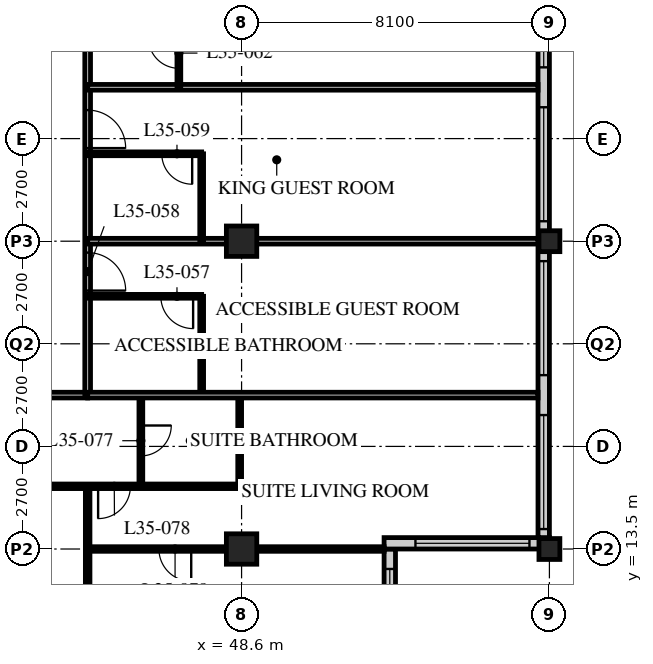
"""IFC4 building model, lengths in metres.
Left out: names, types, materials, properties, quantities, classifications, styles, units other than length and angle.
Written with IfcOpenShell. Run it as: python <this file> out.ifc"""

import sys

from ifc_helpers import new_model, si_unit, direction, frame, frame_2d, origin, origin_2d, place, context, subcontext, project, spatial, rectangle, hollow_rectangle, extrude, element, fill, save


model = new_model("IFC4")
c1 = context("Model", 3, precision=1e-05, world=origin(), true_north=direction((0.0, 1.0)))
c2 = subcontext(c1, "Body", "Model", "MODEL_VIEW")
j1 = project(units=[si_unit("LENGTHUNIT", "METRE"), si_unit("PLANEANGLEUNIT", "RADIAN")], contexts=[c1])
p1 = place(None, origin())
s1 = spatial("IfcSite", under=j1, at=p1, CompositionType="ELEMENT")
p2 = place(p1, origin())
s2 = spatial("IfcBuilding", under=s1, at=p2, CompositionType="ELEMENT")
p3 = place(p2, frame((0.0, 0.0, 137.4)))
s3 = spatial("IfcBuildingStorey", under=s2, at=p3, CompositionType="ELEMENT", Elevation=137.4)
for number, where, z_axis, x_axis in (
    (1, (48.6, 13.5, 0.0), (0.0, 0.0, 1.0), (1.0, 0.0, 0.0)),
    (2, (48.6, 21.6, 0.0), (0.0, 0.0, 1.0), (1.0, 0.0, 0.0)),
):
    element("IfcColumn", number, at=place(p3, frame(where, z_axis=z_axis, x_axis=x_axis)), inside=s3, PredefinedType="COLUMN", context=c2, shape_type="SweptSolid", body=[
        extrude(hollow_rectangle(XDim=0.8, YDim=0.8, WallThickness=0.08, at=origin_2d()), origin(), (0.0, 0.0, 1.0), 3.4),
    ])
for number, where, z_axis, x_axis in (
    (3, (56.7, 13.5, 0.0), (0.0, 0.0, 1.0), (1.0, 0.0, 0.0)),
    (4, (56.7, 21.6, 0.0), (0.0, 0.0, 1.0), (1.0, 0.0, 0.0)),
):
    element("IfcColumn", number, at=place(p3, frame(where, z_axis=z_axis, x_axis=x_axis)), inside=s3, PredefinedType="COLUMN", context=c2, shape_type="SweptSolid", body=[
        extrude(hollow_rectangle(XDim=0.55, YDim=0.55, WallThickness=0.04, at=origin_2d()), origin(), (0.0, 0.0, 1.0), 3.4),
    ])
p4 = place(p3, frame((52.5, 9.75, 0.0), z_axis=(0.0, 0.0, 1.0), x_axis=(0.0, 1.0, 0.0)))
e5 = element("IfcWall", 5, at=p4, inside=s3, PredefinedType="SOLIDWALL", context=c2, shape_type="SweptSolid", body=[
    extrude(rectangle(XDim=3.75, YDim=0.3, at=frame_2d((1.875, 0.0))), origin(), (0.0, 0.0, 1.0), 3.19),
])
p5 = place(p4, frame((0.225, 0.0, 0.9)))
e6 = element("IfcOpeningElement", 6, at=p5, cuts=e5, PredefinedType="OPENING", context=c2, shape_type="SweptSolid", body=[
    extrude(rectangle(XDim=3.0, YDim=1.5, at=frame_2d((1.5, 0.75))), frame((0.0, 0.16, 0.0), z_axis=(0.0, -1.0, 0.0), x_axis=(1.0, 0.0, 0.0)), (0.0, 0.0, 1.0), 0.32),
])
p6 = place(p3, frame((52.35, 13.65, 0.0), z_axis=(0.0, 0.0, 1.0), x_axis=(1.0, 0.0, 0.0)))
e7 = element("IfcWall", 7, at=p6, inside=s3, PredefinedType="SOLIDWALL", context=c2, shape_type="SweptSolid", body=[
    extrude(rectangle(XDim=4.35, YDim=0.3, at=frame_2d((2.175, 0.0))), origin(), (0.0, 0.0, 1.0), 3.19),
])
p7 = place(p6, frame((0.825, 0.0, 0.9)))
e8 = element("IfcOpeningElement", 8, at=p7, cuts=e7, PredefinedType="OPENING", context=c2, shape_type="SweptSolid", body=[
    extrude(rectangle(XDim=3.0, YDim=1.5, at=frame_2d((1.5, 0.75))), frame((0.0, 0.16, 0.0), z_axis=(0.0, -1.0, 0.0), x_axis=(1.0, 0.0, 0.0)), (0.0, 0.0, 1.0), 0.32),
])
p8 = place(p3, frame((56.55, 13.8, 0.0), z_axis=(0.0, 0.0, 1.0), x_axis=(0.0, 1.0, 0.0)))
e9 = element("IfcWall", 9, at=p8, inside=s3, PredefinedType="SOLIDWALL", context=c2, shape_type="SweptSolid", body=[
    extrude(rectangle(XDim=32.1, YDim=0.3, at=frame_2d((16.05, 0.0))), origin(), (0.0, 0.0, 1.0), 3.19),
])
p9 = place(p8, frame((0.225, 0.0, 0.9)))
e10 = element("IfcOpeningElement", 10, at=p9, cuts=e9, PredefinedType="OPENING", context=c2, shape_type="SweptSolid", body=[
    extrude(rectangle(XDim=3.0, YDim=2.0, at=frame_2d((1.5, 1.0))), frame((0.0, 0.16, 0.0), z_axis=(0.0, -1.0, 0.0), x_axis=(1.0, 0.0, 0.0)), (0.0, 0.0, 1.0), 0.32),
])
p10 = place(p8, frame((4.275, 0.0, 0.9)))
e11 = element("IfcOpeningElement", 11, at=p10, cuts=e9, PredefinedType="OPENING", context=c2, shape_type="SweptSolid", body=[
    extrude(rectangle(XDim=3.0, YDim=2.0, at=frame_2d((1.5, 1.0))), frame((0.0, 0.16, 0.0), z_axis=(0.0, -1.0, 0.0), x_axis=(1.0, 0.0, 0.0)), (0.0, 0.0, 1.0), 0.32),
])
p11 = place(p8, frame((8.325, 0.0, 0.9)))
e12 = element("IfcOpeningElement", 12, at=p11, cuts=e9, PredefinedType="OPENING", context=c2, shape_type="SweptSolid", body=[
    extrude(rectangle(XDim=3.0, YDim=2.0, at=frame_2d((1.5, 1.0))), frame((0.0, 0.16, 0.0), z_axis=(0.0, -1.0, 0.0), x_axis=(1.0, 0.0, 0.0)), (0.0, 0.0, 1.0), 0.32),
])
p12 = place(p8, frame((12.375, 0.0, 0.9)))
e13 = element("IfcOpeningElement", 13, at=p12, cuts=e9, PredefinedType="OPENING", context=c2, shape_type="SweptSolid", body=[
    extrude(rectangle(XDim=3.0, YDim=2.0, at=frame_2d((1.5, 1.0))), frame((0.0, 0.16, 0.0), z_axis=(0.0, -1.0, 0.0), x_axis=(1.0, 0.0, 0.0)), (0.0, 0.0, 1.0), 0.32),
])
p13 = place(p8, frame((16.425, 0.0, 0.9)))
e14 = element("IfcOpeningElement", 14, at=p13, cuts=e9, PredefinedType="OPENING", context=c2, shape_type="SweptSolid", body=[
    extrude(rectangle(XDim=3.0, YDim=2.0, at=frame_2d((1.5, 1.0))), frame((0.0, 0.16, 0.0), z_axis=(0.0, -1.0, 0.0), x_axis=(1.0, 0.0, 0.0)), (0.0, 0.0, 1.0), 0.32),
])
p14 = place(p8, frame((20.475, 0.0, 0.9)))
e15 = element("IfcOpeningElement", 15, at=p14, cuts=e9, PredefinedType="OPENING", context=c2, shape_type="SweptSolid", body=[
    extrude(rectangle(XDim=3.0, YDim=2.0, at=frame_2d((1.5, 1.0))), frame((0.0, 0.16, 0.0), z_axis=(0.0, -1.0, 0.0), x_axis=(1.0, 0.0, 0.0)), (0.0, 0.0, 1.0), 0.32),
])
p15 = place(p8, frame((24.525, 0.0, 0.9)))
e16 = element("IfcOpeningElement", 16, at=p15, cuts=e9, PredefinedType="OPENING", context=c2, shape_type="SweptSolid", body=[
    extrude(rectangle(XDim=3.0, YDim=2.0, at=frame_2d((1.5, 1.0))), frame((0.0, 0.16, 0.0), z_axis=(0.0, -1.0, 0.0), x_axis=(1.0, 0.0, 0.0)), (0.0, 0.0, 1.0), 0.32),
])
p16 = place(p8, frame((28.575, 0.0, 0.9)))
e17 = element("IfcOpeningElement", 17, at=p16, cuts=e9, PredefinedType="OPENING", context=c2, shape_type="SweptSolid", body=[
    extrude(rectangle(XDim=3.0, YDim=2.0, at=frame_2d((1.5, 1.0))), frame((0.0, 0.16, 0.0), z_axis=(0.0, -1.0, 0.0), x_axis=(1.0, 0.0, 0.0)), (0.0, 0.0, 1.0), 0.32),
])
p17 = place(p3, frame((8.1, 17.55, 0.0), z_axis=(0.0, 0.0, 1.0), x_axis=(1.0, 0.0, 0.0)))
e18 = element("IfcWall", 18, at=p17, inside=s3, PredefinedType="PARTITIONING", context=c2, shape_type="SweptSolid", body=[
    extrude(rectangle(XDim=36.45, YDim=0.15, at=frame_2d((18.225, 0.0))), origin(), (0.0, 0.0, 1.0), 3.19),
])
p18 = place(p17, frame((9.625, 0.0, 0.0)))
e19 = element("IfcOpeningElement", 19, at=p18, cuts=e18, PredefinedType="OPENING", context=c2, shape_type="SweptSolid", body=[
    extrude(rectangle(XDim=1.0, YDim=2.1, at=frame_2d((0.5, 1.05))), frame((0.0, 0.085, 0.0), z_axis=(0.0, -1.0, 0.0), x_axis=(1.0, 0.0, 0.0)), (0.0, 0.0, 1.0), 0.17),
])
p19 = place(p17, frame((18.1, 0.0, 0.0)))
e20 = element("IfcOpeningElement", 20, at=p19, cuts=e18, PredefinedType="OPENING", context=c2, shape_type="SweptSolid", body=[
    extrude(rectangle(XDim=1.0, YDim=2.1, at=frame_2d((0.5, 1.05))), frame((0.0, 0.085, 0.0), z_axis=(0.0, -1.0, 0.0), x_axis=(1.0, 0.0, 0.0)), (0.0, 0.0, 1.0), 0.17),
])
p20 = place(p17, frame((26.75, 0.0, 0.0)))
e21 = element("IfcOpeningElement", 21, at=p20, cuts=e18, PredefinedType="OPENING", context=c2, shape_type="SweptSolid", body=[
    extrude(rectangle(XDim=1.0, YDim=2.1, at=frame_2d((0.5, 1.05))), frame((0.0, 0.085, 0.0), z_axis=(0.0, -1.0, 0.0), x_axis=(1.0, 0.0, 0.0)), (0.0, 0.0, 1.0), 0.17),
])
p21 = place(p17, frame((30.8, 0.0, 0.0)))
e22 = element("IfcOpeningElement", 22, at=p21, cuts=e18, PredefinedType="OPENING", context=c2, shape_type="SweptSolid", body=[
    extrude(rectangle(XDim=1.0, YDim=2.1, at=frame_2d((0.5, 1.05))), frame((0.0, 0.085, 0.0), z_axis=(0.0, -1.0, 0.0), x_axis=(1.0, 0.0, 0.0)), (0.0, 0.0, 1.0), 0.17),
])
p22 = place(p17, frame((1.525, 0.0, 0.0)))
e23 = element("IfcOpeningElement", 23, at=p22, cuts=e18, PredefinedType="OPENING", context=c2, shape_type="SweptSolid", body=[
    extrude(rectangle(XDim=1.0, YDim=2.1, at=frame_2d((0.5, 1.05))), frame((0.0, 0.085, 0.0), z_axis=(0.0, -1.0, 0.0), x_axis=(1.0, 0.0, 0.0)), (0.0, 0.0, 1.0), 0.17),
])
p23 = place(p17, frame((33.925, 0.0, 0.0)))
e24 = element("IfcOpeningElement", 24, at=p23, cuts=e18, PredefinedType="OPENING", context=c2, shape_type="SweptSolid", body=[
    extrude(rectangle(XDim=1.0, YDim=2.1, at=frame_2d((0.5, 1.05))), frame((0.0, 0.085, 0.0), z_axis=(0.0, -1.0, 0.0), x_axis=(1.0, 0.0, 0.0)), (0.0, 0.0, 1.0), 0.17),
])
p24 = place(p3, frame((44.55, 17.55, 0.0), z_axis=(0.0, 0.0, 1.0), x_axis=(0.0, 1.0, 0.0)))
e25 = element("IfcWall", 25, at=p24, inside=s3, PredefinedType="PARTITIONING", context=c2, shape_type="SweptSolid", body=[
    extrude(rectangle(XDim=28.35, YDim=0.15, at=frame_2d((14.175, 0.0))), origin(), (0.0, 0.0, 1.0), 3.19),
])
p25 = place(p24, frame((2.75, 0.0, 0.0)))
e26 = element("IfcOpeningElement", 26, at=p25, cuts=e25, PredefinedType="OPENING", context=c2, shape_type="SweptSolid", body=[
    extrude(rectangle(XDim=1.0, YDim=2.1, at=frame_2d((0.5, 1.05))), frame((0.0, 0.085, 0.0), z_axis=(0.0, -1.0, 0.0), x_axis=(1.0, 0.0, 0.0)), (0.0, 0.0, 1.0), 0.17),
])
p26 = place(p24, frame((6.5, 0.0, 0.0)))
e27 = element("IfcOpeningElement", 27, at=p26, cuts=e25, PredefinedType="OPENING", context=c2, shape_type="SweptSolid", body=[
    extrude(rectangle(XDim=1.0, YDim=2.1, at=frame_2d((0.5, 1.05))), frame((0.0, 0.085, 0.0), z_axis=(0.0, -1.0, 0.0), x_axis=(1.0, 0.0, 0.0)), (0.0, 0.0, 1.0), 0.17),
])
p27 = place(p24, frame((13.55, 0.0, 0.0)))
e28 = element("IfcOpeningElement", 28, at=p27, cuts=e25, PredefinedType="OPENING", context=c2, shape_type="SweptSolid", body=[
    extrude(rectangle(XDim=1.0, YDim=2.1, at=frame_2d((0.5, 1.05))), frame((0.0, 0.085, 0.0), z_axis=(0.0, -1.0, 0.0), x_axis=(1.0, 0.0, 0.0)), (0.0, 0.0, 1.0), 0.17),
])
p28 = place(p24, frame((18.1, 0.0, 0.0)))
e29 = element("IfcOpeningElement", 29, at=p28, cuts=e25, PredefinedType="OPENING", context=c2, shape_type="SweptSolid", body=[
    extrude(rectangle(XDim=1.0, YDim=2.1, at=frame_2d((0.5, 1.05))), frame((0.0, 0.085, 0.0), z_axis=(0.0, -1.0, 0.0), x_axis=(1.0, 0.0, 0.0)), (0.0, 0.0, 1.0), 0.17),
])
p29 = place(p24, frame((26.75, 0.0, 0.0)))
e30 = element("IfcOpeningElement", 30, at=p29, cuts=e25, PredefinedType="OPENING", context=c2, shape_type="SweptSolid", body=[
    extrude(rectangle(XDim=1.0, YDim=2.1, at=frame_2d((0.5, 1.05))), frame((0.0, 0.085, 0.0), z_axis=(0.0, -1.0, 0.0), x_axis=(1.0, 0.0, 0.0)), (0.0, 0.0, 1.0), 0.17),
])
p30 = place(p3, frame((47.55, 17.55, 0.0), z_axis=(0.0, 0.0, 1.0), x_axis=(0.0, 1.0, 0.0)))
e31 = element("IfcWall", 31, at=p30, inside=s3, PredefinedType="PARTITIONING", context=c2, shape_type="SweptSolid", body=[
    extrude(rectangle(XDim=2.6, YDim=0.1, at=frame_2d((1.3, 0.0))), origin(), (0.0, 0.0, 1.0), 3.19),
])
p31 = place(p3, frame((44.55, 20.15, 0.0), z_axis=(0.0, 0.0, 1.0), x_axis=(1.0, 0.0, 0.0)))
e32 = element("IfcWall", 32, at=p31, inside=s3, PredefinedType="PARTITIONING", context=c2, shape_type="SweptSolid", body=[
    extrude(rectangle(XDim=3.0, YDim=0.1, at=frame_2d((1.5, 0.0))), origin(), (0.0, 0.0, 1.0), 3.19),
])
p32 = place(p31, frame((1.925, 0.0, 0.0)))
e33 = element("IfcOpeningElement", 33, at=p32, cuts=e32, PredefinedType="OPENING", context=c2, shape_type="SweptSolid", body=[
    extrude(rectangle(XDim=0.85, YDim=2.1, at=frame_2d((0.425, 1.05))), frame((0.0, 0.06, 0.0), z_axis=(0.0, -1.0, 0.0), x_axis=(1.0, 0.0, 0.0)), (0.0, 0.0, 1.0), 0.12),
])
p33 = place(p3, frame((44.55, 21.6, 0.0), z_axis=(0.0, 0.0, 1.0), x_axis=(1.0, 0.0, 0.0)))
e34 = element("IfcWall", 34, at=p33, inside=s3, PredefinedType="PARTITIONING", context=c2, shape_type="SweptSolid", body=[
    extrude(rectangle(XDim=11.85, YDim=0.15, at=frame_2d((5.925, 0.0))), origin(), (0.0, 0.0, 1.0), 2.578),
])
p34 = place(p3, frame((47.55, 21.6, 0.0), z_axis=(0.0, 0.0, 1.0), x_axis=(0.0, 1.0, 0.0)))
e35 = element("IfcWall", 35, at=p34, inside=s3, PredefinedType="PARTITIONING", context=c2, shape_type="SweptSolid", body=[
    extrude(rectangle(XDim=2.3, YDim=0.1, at=frame_2d((1.15, 0.0))), origin(), (0.0, 0.0, 1.0), 3.19),
])
p35 = place(p3, frame((44.55, 23.9, 0.0), z_axis=(0.0, 0.0, 1.0), x_axis=(1.0, 0.0, 0.0)))
e36 = element("IfcWall", 36, at=p35, inside=s3, PredefinedType="PARTITIONING", context=c2, shape_type="SweptSolid", body=[
    extrude(rectangle(XDim=3.0, YDim=0.1, at=frame_2d((1.5, 0.0))), origin(), (0.0, 0.0, 1.0), 3.19),
])
p36 = place(p35, frame((1.95, 0.0, 0.0)))
e37 = element("IfcOpeningElement", 37, at=p36, cuts=e36, PredefinedType="OPENING", context=c2, shape_type="SweptSolid", body=[
    extrude(rectangle(XDim=0.8, YDim=2.1, at=frame_2d((0.4, 1.05))), frame((0.0, 0.06, 0.0), z_axis=(0.0, -1.0, 0.0), x_axis=(1.0, 0.0, 0.0)), (0.0, 0.0, 1.0), 0.12),
])
p37 = place(p3, frame((44.55, 25.65, 0.0), z_axis=(0.0, 0.0, 1.0), x_axis=(1.0, 0.0, 0.0)))
e38 = element("IfcWall", 38, at=p37, inside=s3, PredefinedType="PARTITIONING", context=c2, shape_type="SweptSolid", body=[
    extrude(rectangle(XDim=11.85, YDim=0.15, at=frame_2d((5.925, 0.0))), origin(), (0.0, 0.0, 1.0), 3.19),
])
p38 = place(p3, frame((46.95, 25.65, 0.0), z_axis=(0.0, 0.0, 1.0), x_axis=(0.0, 1.0, 0.0)))
e39 = element("IfcWall", 39, at=p38, inside=s3, PredefinedType="PARTITIONING", context=c2, shape_type="SweptSolid", body=[
    extrude(rectangle(XDim=1.8, YDim=0.1, at=frame_2d((0.9, 0.0))), origin(), (0.0, 0.0, 1.0), 3.19),
])
p39 = place(p38, frame((0.5, 0.0, 0.0)))
e40 = element("IfcOpeningElement", 40, at=p39, cuts=e39, PredefinedType="OPENING", context=c2, shape_type="SweptSolid", body=[
    extrude(rectangle(XDim=0.8, YDim=2.1, at=frame_2d((0.4, 1.05))), frame((0.0, 0.06, 0.0), z_axis=(0.0, -1.0, 0.0), x_axis=(1.0, 0.0, 0.0)), (0.0, 0.0, 1.0), 0.12),
])
p40 = place(p3, frame((40.5, 15.15, 0.0), z_axis=(0.0, 0.0, 1.0), x_axis=(1.0, 0.0, 0.0)))
e41 = element("IfcWall", 41, at=p40, inside=s3, PredefinedType="PARTITIONING", context=c2, shape_type="SweptSolid", body=[
    extrude(rectangle(XDim=8.05, YDim=0.12, at=frame_2d((4.025, 0.0))), origin(), (0.0, 0.0, 1.0), 3.19),
])
p41 = place(p40, frame((0.475, 0.0, 0.0)))
e42 = element("IfcOpeningElement", 42, at=p41, cuts=e41, PredefinedType="OPENING", context=c2, shape_type="SweptSolid", body=[
    extrude(rectangle(XDim=0.85, YDim=2.1, at=frame_2d((0.425, 1.05))), frame((0.0, 0.07, 0.0), z_axis=(0.0, -1.0, 0.0), x_axis=(1.0, 0.0, 0.0)), (0.0, 0.0, 1.0), 0.14),
])
p42 = place(p40, frame((4.325, 0.0, 0.0)))
e43 = element("IfcOpeningElement", 43, at=p42, cuts=e41, PredefinedType="OPENING", context=c2, shape_type="SweptSolid", body=[
    extrude(rectangle(XDim=0.85, YDim=2.1, at=frame_2d((0.425, 1.05))), frame((0.0, 0.07, 0.0), z_axis=(0.0, -1.0, 0.0), x_axis=(1.0, 0.0, 0.0)), (0.0, 0.0, 1.0), 0.14),
])
p43 = place(p3, frame((45.95, 17.55, 0.0), z_axis=(0.0, 0.0, 1.0), x_axis=(0.0, -1.0, 0.0)))
e44 = element("IfcWall", 44, at=p43, inside=s3, PredefinedType="PARTITIONING", context=c2, shape_type="SweptSolid", body=[
    extrude(rectangle(XDim=2.4, YDim=0.1, at=frame_2d((1.2, 0.0))), origin(), (0.0, 0.0, 1.0), 3.19),
])
p44 = place(p43, frame((0.8, 0.0, 0.0)))
e45 = element("IfcOpeningElement", 45, at=p44, cuts=e44, PredefinedType="OPENING", context=c2, shape_type="SweptSolid", body=[
    extrude(rectangle(XDim=0.8, YDim=2.1, at=frame_2d((0.4, 1.05))), frame((0.0, 0.06, 0.0), z_axis=(0.0, -1.0, 0.0), x_axis=(1.0, 0.0, 0.0)), (0.0, 0.0, 1.0), 0.12),
])
p45 = place(p3, frame((48.55, 17.55, 0.0), z_axis=(0.0, 0.0, 1.0), x_axis=(0.0, -1.0, 0.0)))
e46 = element("IfcWall", 46, at=p45, inside=s3, PredefinedType="PARTITIONING", context=c2, shape_type="SweptSolid", body=[
    extrude(rectangle(XDim=2.4, YDim=0.1, at=frame_2d((1.2, 0.0))), origin(), (0.0, 0.0, 1.0), 2.578),
])
p46 = place(p3, frame((44.55, 15.15, 0.0), z_axis=(0.0, 0.0, 1.0), x_axis=(0.0, -1.0, 0.0)))
e47 = element("IfcWall", 47, at=p46, inside=s3, PredefinedType="PARTITIONING", context=c2, shape_type="SweptSolid", body=[
    extrude(rectangle(XDim=9.45, YDim=0.12, at=frame_2d((4.725, 0.0))), origin(), (0.0, 0.0, 1.0), 3.19),
])
p47 = place(p3, frame((44.55, 13.5, 0.0), z_axis=(0.0, 0.0, 1.0), x_axis=(1.0, 0.0, 0.0)))
e48 = element("IfcWall", 48, at=p47, inside=s3, PredefinedType="PARTITIONING", context=c2, shape_type="SweptSolid", body=[
    extrude(rectangle(XDim=7.8, YDim=0.12, at=frame_2d((3.9, 0.0))), origin(), (0.0, 0.0, 1.0), 2.578),
])
p48 = place(p47, frame((1.875, 0.0, 0.0)))
e49 = element("IfcOpeningElement", 49, at=p48, cuts=e48, PredefinedType="OPENING", context=c2, shape_type="SweptSolid", body=[
    extrude(rectangle(XDim=0.85, YDim=2.1, at=frame_2d((0.425, 1.05))), frame((0.0, 0.07, 0.0), z_axis=(0.0, -1.0, 0.0), x_axis=(1.0, 0.0, 0.0)), (0.0, 0.0, 1.0), 0.14),
])
p49 = place(p3, frame((44.55, 17.55, 0.0), z_axis=(0.0, 0.0, 1.0), x_axis=(1.0, 0.0, 0.0)))
e50 = element("IfcWall", 50, at=p49, inside=s3, PredefinedType="PARTITIONING", context=c2, shape_type="SweptSolid", body=[
    extrude(rectangle(XDim=11.85, YDim=0.15, at=frame_2d((5.925, 0.0))), origin(), (0.0, 0.0, 1.0), 3.19),
])
p50 = place(p5, origin())
e51 = element("IfcWindow", 51, at=p50, inside=s3, PartitioningType="SINGLE_PANEL", PredefinedType="WINDOW", context=c2, shape_type="SweptSolid", body=[
    extrude(rectangle(XDim=3.0, YDim=1.5, at=frame_2d((1.5, 0.75))), frame((0.0, 0.03, 0.0), z_axis=(0.0, -1.0, 0.0), x_axis=(1.0, 0.0, 0.0)), (0.0, 0.0, 1.0), 0.06),
])
fill(e6, e51)
p51 = place(p7, origin())
e52 = element("IfcWindow", 52, at=p51, inside=s3, PartitioningType="SINGLE_PANEL", PredefinedType="WINDOW", context=c2, shape_type="SweptSolid", body=[
    extrude(rectangle(XDim=3.0, YDim=1.5, at=frame_2d((1.5, 0.75))), frame((0.0, 0.03, 0.0), z_axis=(0.0, -1.0, 0.0), x_axis=(1.0, 0.0, 0.0)), (0.0, 0.0, 1.0), 0.06),
])
fill(e8, e52)
p52 = place(p9, origin())
e53 = element("IfcWindow", 53, at=p52, inside=s3, PartitioningType="SINGLE_PANEL", PredefinedType="WINDOW", context=c2, shape_type="SweptSolid", body=[
    extrude(rectangle(XDim=3.0, YDim=2.0, at=frame_2d((1.5, 1.0))), frame((0.0, 0.03, 0.0), z_axis=(0.0, -1.0, 0.0), x_axis=(1.0, 0.0, 0.0)), (0.0, 0.0, 1.0), 0.06),
])
fill(e10, e53)
p53 = place(p10, origin())
e54 = element("IfcWindow", 54, at=p53, inside=s3, PartitioningType="SINGLE_PANEL", PredefinedType="WINDOW", context=c2, shape_type="SweptSolid", body=[
    extrude(rectangle(XDim=3.0, YDim=2.0, at=frame_2d((1.5, 1.0))), frame((0.0, 0.03, 0.0), z_axis=(0.0, -1.0, 0.0), x_axis=(1.0, 0.0, 0.0)), (0.0, 0.0, 1.0), 0.06),
])
fill(e11, e54)
p54 = place(p11, origin())
e55 = element("IfcWindow", 55, at=p54, inside=s3, PartitioningType="SINGLE_PANEL", PredefinedType="WINDOW", context=c2, shape_type="SweptSolid", body=[
    extrude(rectangle(XDim=3.0, YDim=2.0, at=frame_2d((1.5, 1.0))), frame((0.0, 0.03, 0.0), z_axis=(0.0, -1.0, 0.0), x_axis=(1.0, 0.0, 0.0)), (0.0, 0.0, 1.0), 0.06),
])
fill(e12, e55)
p55 = place(p12, origin())
e56 = element("IfcWindow", 56, at=p55, inside=s3, PartitioningType="SINGLE_PANEL", PredefinedType="WINDOW", context=c2, shape_type="SweptSolid", body=[
    extrude(rectangle(XDim=3.0, YDim=2.0, at=frame_2d((1.5, 1.0))), frame((0.0, 0.03, 0.0), z_axis=(0.0, -1.0, 0.0), x_axis=(1.0, 0.0, 0.0)), (0.0, 0.0, 1.0), 0.06),
])
fill(e13, e56)
p56 = place(p32, origin())
e57 = element("IfcDoor", 57, at=p56, inside=s3, OperationType="SINGLE_SWING_LEFT", PredefinedType="DOOR", context=c2, shape_type="SweptSolid", body=[
    extrude(rectangle(XDim=0.85, YDim=2.1, at=frame_2d((0.425, 1.05))), frame((0.0, 0.025, 0.0), z_axis=(0.0, -1.0, 0.0), x_axis=(1.0, 0.0, 0.0)), (0.0, 0.0, 1.0), 0.05),
])
fill(e33, e57)
p57 = place(p25, origin())
e58 = element("IfcDoor", 58, at=p57, inside=s3, OperationType="SINGLE_SWING_RIGHT", PredefinedType="DOOR", context=c2, shape_type="SweptSolid", body=[
    extrude(rectangle(XDim=1.0, YDim=2.1, at=frame_2d((0.5, 1.05))), frame((0.0, 0.025, 0.0), z_axis=(0.0, -1.0, 0.0), x_axis=(1.0, 0.0, 0.0)), (0.0, 0.0, 1.0), 0.05),
])
fill(e26, e58)
p58 = place(p36, origin())
e59 = element("IfcDoor", 59, at=p58, inside=s3, OperationType="SINGLE_SWING_LEFT", PredefinedType="DOOR", context=c2, shape_type="SweptSolid", body=[
    extrude(rectangle(XDim=0.8, YDim=2.1, at=frame_2d((0.4, 1.05))), frame((0.0, 0.025, 0.0), z_axis=(0.0, -1.0, 0.0), x_axis=(1.0, 0.0, 0.0)), (0.0, 0.0, 1.0), 0.05),
])
fill(e37, e59)
p59 = place(p26, origin())
e60 = element("IfcDoor", 60, at=p59, inside=s3, OperationType="SINGLE_SWING_RIGHT", PredefinedType="DOOR", context=c2, shape_type="SweptSolid", body=[
    extrude(rectangle(XDim=1.0, YDim=2.1, at=frame_2d((0.5, 1.05))), frame((0.0, 0.025, 0.0), z_axis=(0.0, -1.0, 0.0), x_axis=(1.0, 0.0, 0.0)), (0.0, 0.0, 1.0), 0.05),
])
fill(e27, e60)
p60 = place(p39, origin())
e61 = element("IfcDoor", 61, at=p60, inside=s3, OperationType="SINGLE_SWING_RIGHT", PredefinedType="DOOR", context=c2, shape_type="SweptSolid", body=[
    extrude(rectangle(XDim=0.8, YDim=2.1, at=frame_2d((0.4, 1.05))), frame((0.0, 0.025, 0.0), z_axis=(0.0, -1.0, 0.0), x_axis=(1.0, 0.0, 0.0)), (0.0, 0.0, 1.0), 0.05),
])
fill(e40, e61)
p61 = place(p44, origin())
e62 = element("IfcDoor", 62, at=p61, inside=s3, OperationType="SINGLE_SWING_LEFT", PredefinedType="DOOR", context=c2, shape_type="SweptSolid", body=[
    extrude(rectangle(XDim=0.8, YDim=2.1, at=frame_2d((0.4, 1.05))), frame((0.0, 0.025, 0.0), z_axis=(0.0, -1.0, 0.0), x_axis=(1.0, 0.0, 0.0)), (0.0, 0.0, 1.0), 0.05),
])
fill(e45, e62)
p62 = place(p42, origin())
e63 = element("IfcDoor", 63, at=p62, inside=s3, OperationType="SINGLE_SWING_RIGHT", PredefinedType="DOOR", context=c2, shape_type="SweptSolid", body=[
    extrude(rectangle(XDim=0.85, YDim=2.1, at=frame_2d((0.425, 1.05))), frame((0.0, 0.025, 0.0), z_axis=(0.0, -1.0, 0.0), x_axis=(1.0, 0.0, 0.0)), (0.0, 0.0, 1.0), 0.05),
])
fill(e43, e63)
p63 = place(p48, origin())
e64 = element("IfcDoor", 64, at=p63, inside=s3, OperationType="SINGLE_SWING_LEFT", PredefinedType="DOOR", context=c2, shape_type="SweptSolid", body=[
    extrude(rectangle(XDim=0.85, YDim=2.1, at=frame_2d((0.425, 1.05))), frame((0.0, 0.025, 0.0), z_axis=(0.0, -1.0, 0.0), x_axis=(1.0, 0.0, 0.0)), (0.0, 0.0, 1.0), 0.05),
])
fill(e49, e64)
save(model, sys.argv[1])
